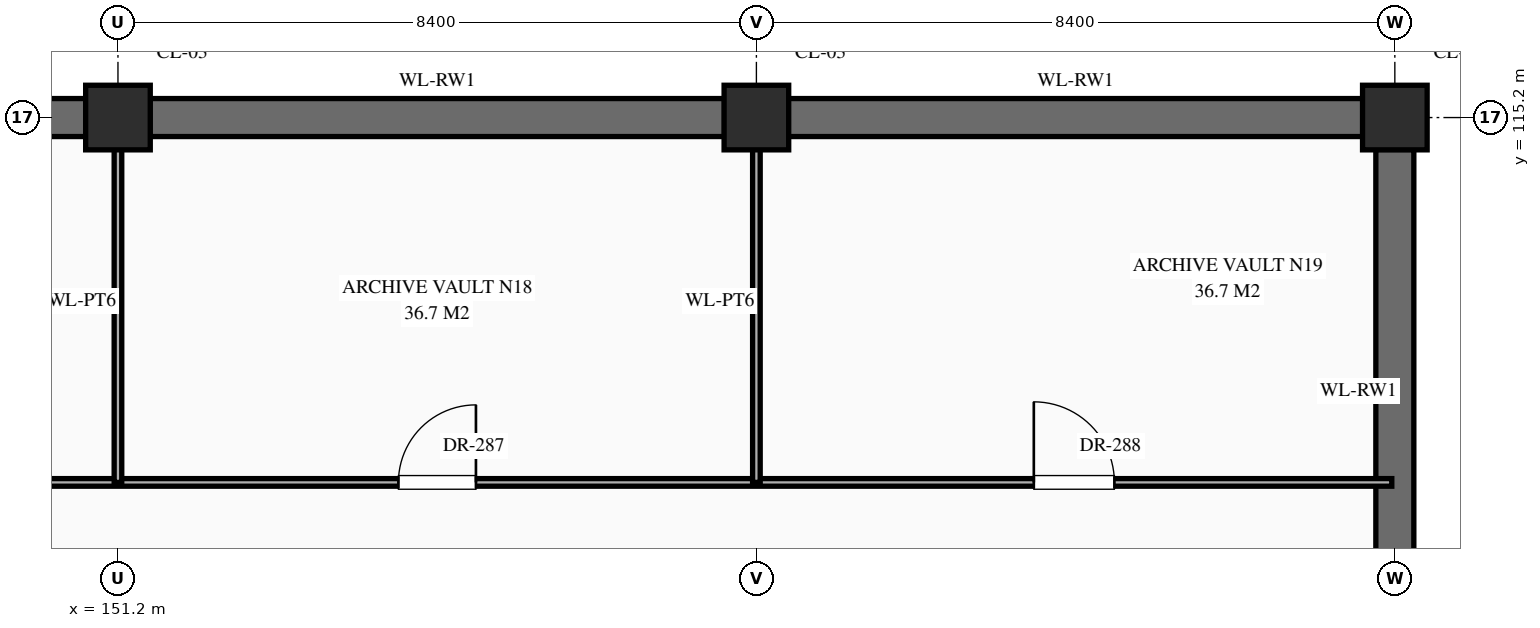
"""IFC4 building model, lengths in metres.
Left out: names, types, materials, properties, quantities, classifications, styles, units other than length and angle.
Written with IfcOpenShell. Run it as: python <this file> out.ifc"""

import sys

from ifc_helpers import new_model, si_unit, direction, frame, frame_2d, origin, origin_2d, place, context, subcontext, project, spatial, rectangle, extrude, element, fill, save


model = new_model("IFC4")
c1 = context("Model", 3, precision=1e-05, world=origin(), true_north=direction((0.0, 1.0)))
c2 = subcontext(c1, "Body", "Model", "MODEL_VIEW")
j1 = project(units=[si_unit("LENGTHUNIT", "METRE"), si_unit("PLANEANGLEUNIT", "RADIAN")], contexts=[c1])
p1 = place(None, origin())
s1 = spatial("IfcSite", under=j1, at=p1, CompositionType="ELEMENT")
p2 = place(p1, origin())
s2 = spatial("IfcBuilding", under=s1, at=p2, CompositionType="ELEMENT")
p3 = place(p2, frame((0.0, 0.0, -10.2)))
s3 = spatial("IfcBuildingStorey", under=s2, at=p3, CompositionType="ELEMENT", Elevation=-10.2)
for number, where, z_axis, x_axis in (
    (1, (151.2, 115.2, 0.0), (0.0, 0.0, 1.0), (1.0, 0.0, 0.0)),
    (2, (159.6, 115.2, 0.0), (0.0, 0.0, 1.0), (1.0, 0.0, 0.0)),
    (3, (168.0, 115.2, 0.0), (0.0, 0.0, 1.0), (1.0, 0.0, 0.0)),
):
    element("IfcColumn", number, at=place(p3, frame(where, z_axis=z_axis, x_axis=x_axis)), inside=s3, PredefinedType="COLUMN", context=c2, shape_type="SweptSolid", body=[
        extrude(rectangle(XDim=0.85, YDim=0.85, at=origin_2d()), origin(), (0.0, 0.0, 1.0), 4.8),
    ])
p4 = place(p3, frame((143.22, 115.2, 0.0), z_axis=(0.0, 0.0, 1.0), x_axis=(1.0, 0.0, 0.0)))
e4 = element("IfcWall", 4, at=p4, inside=s3, PredefinedType="USERDEFINED", context=c2, shape_type="SweptSolid", body=[
    extrude(rectangle(XDim=7.56, YDim=0.5, at=frame_2d((3.78, 0.0))), origin(), (0.0, 0.0, 1.0), 4.48),
])
p5 = place(p3, frame((151.62, 115.2, 0.0), z_axis=(0.0, 0.0, 1.0), x_axis=(1.0, 0.0, 0.0)))
e5 = element("IfcWall", 5, at=p5, inside=s3, PredefinedType="USERDEFINED", context=c2, shape_type="SweptSolid", body=[
    extrude(rectangle(XDim=7.56, YDim=0.5, at=frame_2d((3.78, 0.0))), origin(), (0.0, 0.0, 1.0), 4.48),
])
p6 = place(p3, frame((160.02, 115.2, 0.0), z_axis=(0.0, 0.0, 1.0), x_axis=(1.0, 0.0, 0.0)))
e6 = element("IfcWall", 6, at=p6, inside=s3, PredefinedType="USERDEFINED", context=c2, shape_type="SweptSolid", body=[
    extrude(rectangle(XDim=7.56, YDim=0.5, at=frame_2d((3.78, 0.0))), origin(), (0.0, 0.0, 1.0), 4.48),
])
p7 = place(p3, frame((168.0, 108.42, 0.0), z_axis=(0.0, 0.0, 1.0), x_axis=(0.0, 1.0, 0.0)))
e7 = element("IfcWall", 7, at=p7, inside=s3, PredefinedType="USERDEFINED", context=c2, shape_type="SweptSolid", body=[
    extrude(rectangle(XDim=6.36, YDim=0.5, at=frame_2d((3.18, 0.0))), origin(), (0.0, 0.0, 1.0), 4.48),
])
p8 = place(p3, frame((0.04, 110.4, 0.0), z_axis=(0.0, 0.0, 1.0), x_axis=(1.0, 0.0, 0.0)))
e8 = element("IfcWall", 8, at=p8, inside=s3, PredefinedType="STANDARD", context=c2, shape_type="SweptSolid", body=[
    extrude(rectangle(XDim=167.92, YDim=0.1, at=frame_2d((83.96, 0.0))), origin(), (0.0, 0.0, 1.0), 4.48),
])
p9 = place(p8, frame((3.54, 0.0, 0.0)))
e9 = element("IfcOpeningElement", 9, at=p9, cuts=e8, PredefinedType="OPENING", context=c2, shape_type="SweptSolid", body=[
    extrude(rectangle(XDim=1.28, YDim=2.35, at=frame_2d((0.64, 1.175))), frame((0.0, 0.062, 0.0), z_axis=(0.0, -1.0, 0.0), x_axis=(1.0, 0.0, 0.0)), (0.0, 0.0, 1.0), 0.124),
])
p10 = place(p8, frame((12.09, 0.0, 0.0)))
e10 = element("IfcOpeningElement", 10, at=p10, cuts=e8, PredefinedType="OPENING", context=c2, shape_type="SweptSolid", body=[
    extrude(rectangle(XDim=0.94, YDim=2.3, at=frame_2d((0.47, 1.15))), frame((0.0, 0.062, 0.0), z_axis=(0.0, -1.0, 0.0), x_axis=(1.0, 0.0, 0.0)), (0.0, 0.0, 1.0), 0.124),
])
p11 = place(p8, frame((20.47, 0.0, 0.0)))
e11 = element("IfcOpeningElement", 11, at=p11, cuts=e8, PredefinedType="OPENING", context=c2, shape_type="SweptSolid", body=[
    extrude(rectangle(XDim=0.98, YDim=2.35, at=frame_2d((0.49, 1.175))), frame((0.0, 0.062, 0.0), z_axis=(0.0, -1.0, 0.0), x_axis=(1.0, 0.0, 0.0)), (0.0, 0.0, 1.0), 0.124),
])
p12 = place(p8, frame((28.85, 0.0, 0.0)))
e12 = element("IfcOpeningElement", 12, at=p12, cuts=e8, PredefinedType="OPENING", context=c2, shape_type="SweptSolid", body=[
    extrude(rectangle(XDim=1.02, YDim=2.4, at=frame_2d((0.51, 1.2))), frame((0.0, 0.062, 0.0), z_axis=(0.0, -1.0, 0.0), x_axis=(1.0, 0.0, 0.0)), (0.0, 0.0, 1.0), 0.124),
])
p13 = place(p8, frame((37.23, 0.0, 0.0)))
e13 = element("IfcOpeningElement", 13, at=p13, cuts=e8, PredefinedType="OPENING", context=c2, shape_type="SweptSolid", body=[
    extrude(rectangle(XDim=1.06, YDim=2.4, at=frame_2d((0.53, 1.2))), frame((0.0, 0.062, 0.0), z_axis=(0.0, -1.0, 0.0), x_axis=(1.0, 0.0, 0.0)), (0.0, 0.0, 1.0), 0.124),
])
p14 = place(p8, frame((45.59, 0.0, 0.0)))
e14 = element("IfcOpeningElement", 14, at=p14, cuts=e8, PredefinedType="OPENING", context=c2, shape_type="SweptSolid", body=[
    extrude(rectangle(XDim=1.14, YDim=2.4, at=frame_2d((0.57, 1.2))), frame((0.0, 0.062, 0.0), z_axis=(0.0, -1.0, 0.0), x_axis=(1.0, 0.0, 0.0)), (0.0, 0.0, 1.0), 0.124),
])
p15 = place(p8, frame((54.13, 0.0, 0.0)))
e15 = element("IfcOpeningElement", 15, at=p15, cuts=e8, PredefinedType="OPENING", context=c2, shape_type="SweptSolid", body=[
    extrude(rectangle(XDim=0.86, YDim=2.1, at=frame_2d((0.43, 1.05))), frame((0.0, 0.062, 0.0), z_axis=(0.0, -1.0, 0.0), x_axis=(1.0, 0.0, 0.0)), (0.0, 0.0, 1.0), 0.124),
])
p16 = place(p8, frame((62.5, 0.0, 0.0)))
e16 = element("IfcOpeningElement", 16, at=p16, cuts=e8, PredefinedType="OPENING", context=c2, shape_type="SweptSolid", body=[
    extrude(rectangle(XDim=0.92, YDim=2.15, at=frame_2d((0.46, 1.075))), frame((0.0, 0.062, 0.0), z_axis=(0.0, -1.0, 0.0), x_axis=(1.0, 0.0, 0.0)), (0.0, 0.0, 1.0), 0.124),
])
p17 = place(p8, frame((70.88, 0.0, 0.0)))
e17 = element("IfcOpeningElement", 17, at=p17, cuts=e8, PredefinedType="OPENING", context=c2, shape_type="SweptSolid", body=[
    extrude(rectangle(XDim=0.96, YDim=2.2, at=frame_2d((0.48, 1.1))), frame((0.0, 0.062, 0.0), z_axis=(0.0, -1.0, 0.0), x_axis=(1.0, 0.0, 0.0)), (0.0, 0.0, 1.0), 0.124),
])
p18 = place(p8, frame((79.26, 0.0, 0.0)))
e18 = element("IfcOpeningElement", 18, at=p18, cuts=e8, PredefinedType="OPENING", context=c2, shape_type="SweptSolid", body=[
    extrude(rectangle(XDim=1.0, YDim=2.25, at=frame_2d((0.5, 1.125))), frame((0.0, 0.062, 0.0), z_axis=(0.0, -1.0, 0.0), x_axis=(1.0, 0.0, 0.0)), (0.0, 0.0, 1.0), 0.124),
])
p19 = place(p8, frame((87.62, 0.0, 0.0)))
e19 = element("IfcOpeningElement", 19, at=p19, cuts=e8, PredefinedType="OPENING", context=c2, shape_type="SweptSolid", body=[
    extrude(rectangle(XDim=1.08, YDim=2.25, at=frame_2d((0.54, 1.125))), frame((0.0, 0.062, 0.0), z_axis=(0.0, -1.0, 0.0), x_axis=(1.0, 0.0, 0.0)), (0.0, 0.0, 1.0), 0.124),
])
p20 = place(p8, frame((96.0, 0.0, 0.0)))
e20 = element("IfcOpeningElement", 20, at=p20, cuts=e8, PredefinedType="OPENING", context=c2, shape_type="SweptSolid", body=[
    extrude(rectangle(XDim=1.12, YDim=2.25, at=frame_2d((0.56, 1.125))), frame((0.0, 0.062, 0.0), z_axis=(0.0, -1.0, 0.0), x_axis=(1.0, 0.0, 0.0)), (0.0, 0.0, 1.0), 0.124),
])
p21 = place(p8, frame((104.38, 0.0, 0.0)))
e21 = element("IfcOpeningElement", 21, at=p21, cuts=e8, PredefinedType="OPENING", context=c2, shape_type="SweptSolid", body=[
    extrude(rectangle(XDim=1.16, YDim=2.3, at=frame_2d((0.58, 1.15))), frame((0.0, 0.062, 0.0), z_axis=(0.0, -1.0, 0.0), x_axis=(1.0, 0.0, 0.0)), (0.0, 0.0, 1.0), 0.124),
])
p22 = place(p8, frame((112.76, 0.0, 0.0)))
e22 = element("IfcOpeningElement", 22, at=p22, cuts=e8, PredefinedType="OPENING", context=c2, shape_type="SweptSolid", body=[
    extrude(rectangle(XDim=1.2, YDim=2.35, at=frame_2d((0.6, 1.175))), frame((0.0, 0.062, 0.0), z_axis=(0.0, -1.0, 0.0), x_axis=(1.0, 0.0, 0.0)), (0.0, 0.0, 1.0), 0.124),
])
p23 = place(p8, frame((121.14, 0.0, 0.0)))
e23 = element("IfcOpeningElement", 23, at=p23, cuts=e8, PredefinedType="OPENING", context=c2, shape_type="SweptSolid", body=[
    extrude(rectangle(XDim=1.24, YDim=2.3, at=frame_2d((0.62, 1.15))), frame((0.0, 0.062, 0.0), z_axis=(0.0, -1.0, 0.0), x_axis=(1.0, 0.0, 0.0)), (0.0, 0.0, 1.0), 0.124),
])
p24 = place(p8, frame((129.52, 0.0, 0.0)))
e24 = element("IfcOpeningElement", 24, at=p24, cuts=e8, PredefinedType="OPENING", context=c2, shape_type="SweptSolid", body=[
    extrude(rectangle(XDim=1.28, YDim=2.35, at=frame_2d((0.64, 1.175))), frame((0.0, 0.062, 0.0), z_axis=(0.0, -1.0, 0.0), x_axis=(1.0, 0.0, 0.0)), (0.0, 0.0, 1.0), 0.124),
])
p25 = place(p8, frame((138.09, 0.0, 0.0)))
e25 = element("IfcOpeningElement", 25, at=p25, cuts=e8, PredefinedType="OPENING", context=c2, shape_type="SweptSolid", body=[
    extrude(rectangle(XDim=0.94, YDim=2.3, at=frame_2d((0.47, 1.15))), frame((0.0, 0.062, 0.0), z_axis=(0.0, -1.0, 0.0), x_axis=(1.0, 0.0, 0.0)), (0.0, 0.0, 1.0), 0.124),
])
p26 = place(p8, frame((146.47, 0.0, 0.0)))
e26 = element("IfcOpeningElement", 26, at=p26, cuts=e8, PredefinedType="OPENING", context=c2, shape_type="SweptSolid", body=[
    extrude(rectangle(XDim=0.98, YDim=2.35, at=frame_2d((0.49, 1.175))), frame((0.0, 0.062, 0.0), z_axis=(0.0, -1.0, 0.0), x_axis=(1.0, 0.0, 0.0)), (0.0, 0.0, 1.0), 0.124),
])
p27 = place(p8, frame((154.85, 0.0, 0.0)))
e27 = element("IfcOpeningElement", 27, at=p27, cuts=e8, PredefinedType="OPENING", context=c2, shape_type="SweptSolid", body=[
    extrude(rectangle(XDim=1.02, YDim=2.4, at=frame_2d((0.51, 1.2))), frame((0.0, 0.062, 0.0), z_axis=(0.0, -1.0, 0.0), x_axis=(1.0, 0.0, 0.0)), (0.0, 0.0, 1.0), 0.124),
])
p28 = place(p8, frame((163.21, 0.0, 0.0)))
e28 = element("IfcOpeningElement", 28, at=p28, cuts=e8, PredefinedType="OPENING", context=c2, shape_type="SweptSolid", body=[
    extrude(rectangle(XDim=1.06, YDim=2.4, at=frame_2d((0.53, 1.2))), frame((0.0, 0.062, 0.0), z_axis=(0.0, -1.0, 0.0), x_axis=(1.0, 0.0, 0.0)), (0.0, 0.0, 1.0), 0.124),
])
for number, where, z_axis, x_axis in (
    (29, (151.2, 110.4, 0.0), (0.0, 0.0, 1.0), (0.0, 1.0, 0.0)),
    (30, (159.6, 110.4, 0.0), (0.0, 0.0, 1.0), (0.0, 1.0, 0.0)),
):
    element("IfcWall", number, at=place(p3, frame(where, z_axis=z_axis, x_axis=x_axis)), inside=s3, PredefinedType="STANDARD", context=c2, shape_type="SweptSolid", body=[
        extrude(rectangle(XDim=4.76, YDim=0.1, at=frame_2d((2.38, 0.0))), origin(), (0.0, 0.0, 1.0), 3.73),
    ])
p29 = place(p27, origin())
e31 = element("IfcDoor", 31, at=p29, inside=s3, OperationType="SINGLE_SWING_RIGHT", PredefinedType="DOOR", context=c2, shape_type="SweptSolid", body=[
    extrude(rectangle(XDim=1.02, YDim=2.4, at=frame_2d((0.51, 1.2))), frame((0.0, 0.025, 0.0), z_axis=(0.0, -1.0, 0.0), x_axis=(1.0, 0.0, 0.0)), (0.0, 0.0, 1.0), 0.05),
])
fill(e27, e31)
p30 = place(p28, origin())
e32 = element("IfcDoor", 32, at=p30, inside=s3, OperationType="SINGLE_SWING_LEFT", PredefinedType="DOOR", context=c2, shape_type="SweptSolid", body=[
    extrude(rectangle(XDim=1.06, YDim=2.4, at=frame_2d((0.53, 1.2))), frame((0.0, 0.025, 0.0), z_axis=(0.0, -1.0, 0.0), x_axis=(1.0, 0.0, 0.0)), (0.0, 0.0, 1.0), 0.05),
])
fill(e28, e32)
save(model, sys.argv[1])
